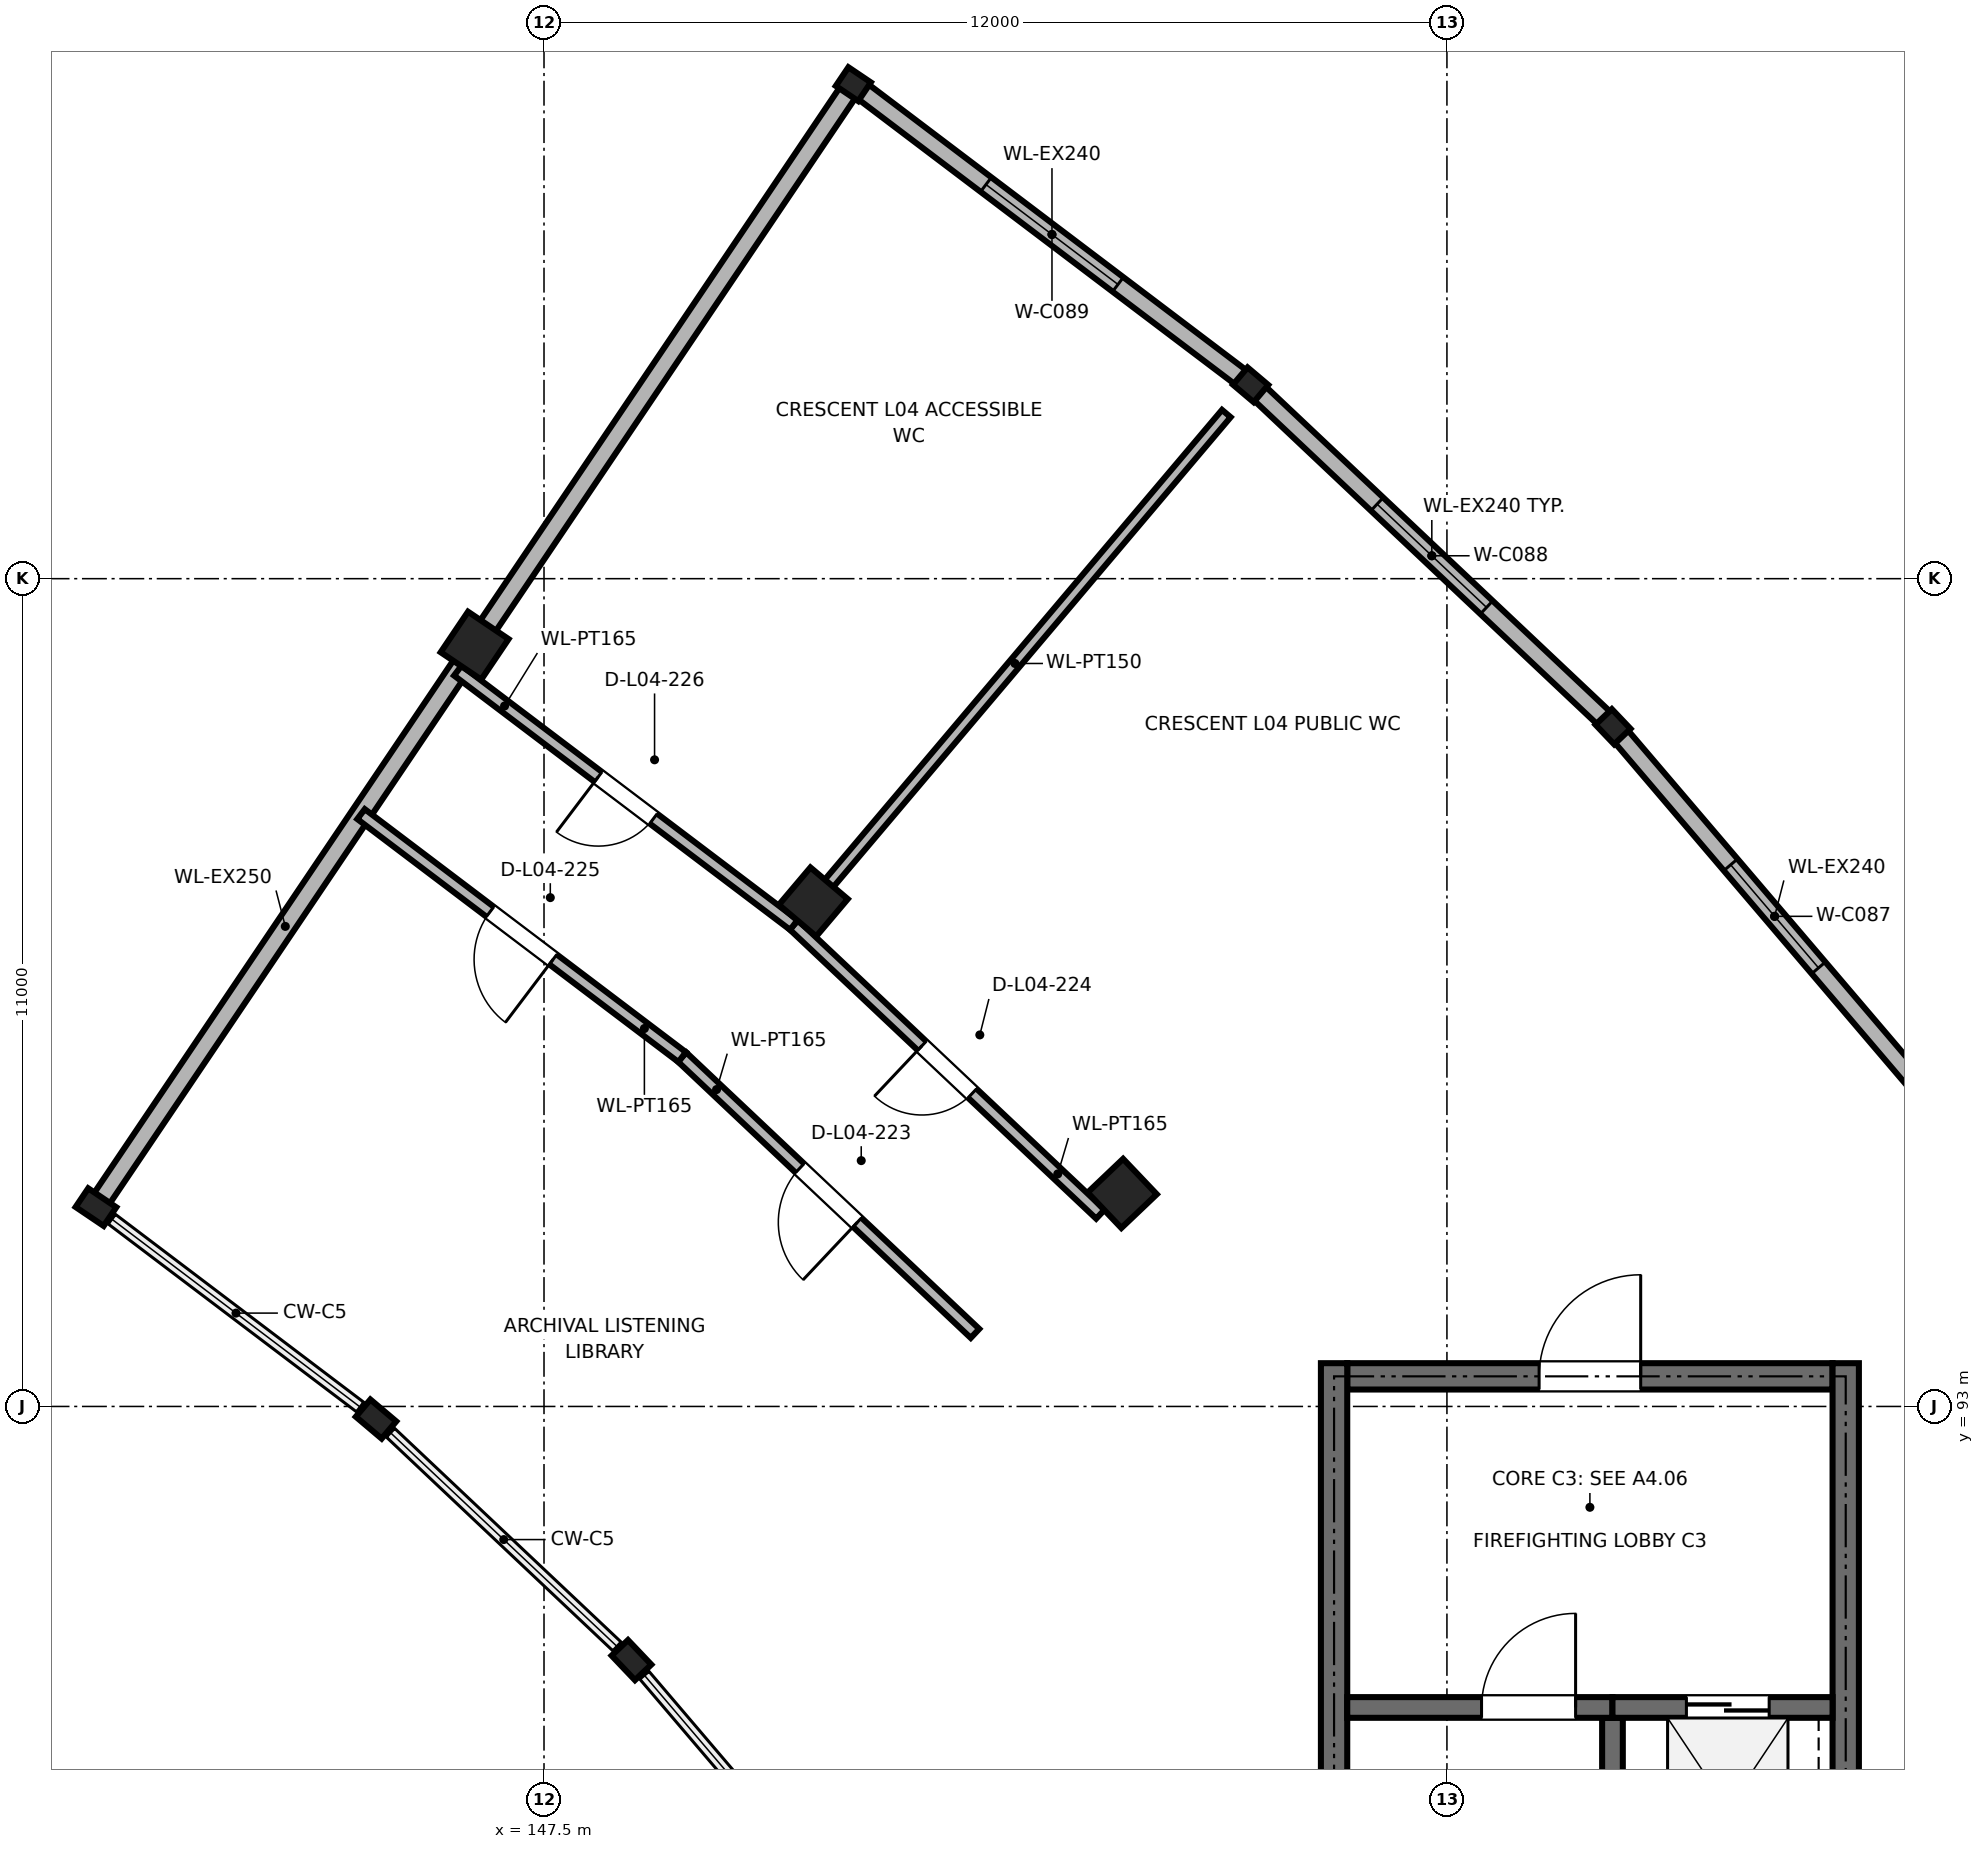
"""IFC4 building model, lengths in metres.
Left out: names, types, materials, properties, quantities, classifications, styles, units other than length and angle.
Written with IfcOpenShell. Run it as: python <this file> out.ifc"""

import sys

from ifc_helpers import new_model, si_unit, direction, frame, frame_2d, origin, origin_2d, place, context, subcontext, project, spatial, rectangle, i_section, extrude, element, fill, save


model = new_model("IFC4")
c1 = context("Model", 3, precision=1e-05, world=origin(), true_north=direction((0.0, 1.0)))
c2 = subcontext(c1, "Body", "Model", "MODEL_VIEW")
j1 = project(units=[si_unit("LENGTHUNIT", "METRE"), si_unit("PLANEANGLEUNIT", "RADIAN")], contexts=[c1])
p1 = place(None, origin())
s1 = spatial("IfcSite", under=j1, at=p1, CompositionType="ELEMENT")
p2 = place(p1, origin())
s2 = spatial("IfcBuilding", under=s1, at=p2, CompositionType="ELEMENT")
p3 = place(p2, frame((0.0, 0.0, 18.6)))
s3 = spatial("IfcBuildingStorey", under=s2, at=p3, CompositionType="ELEMENT", Elevation=18.6)
p4 = place(p3, frame((148.662, 89.629, 0.0), z_axis=(0.0, 0.0, 1.0), x_axis=(0.724653130187, 0.689113808387, 0.0)))
e1 = element("IfcColumn", 1, at=p4, inside=s3, PredefinedType="COLUMN", context=c2, shape_type="SweptSolid", body=[
    extrude(i_section(OverallWidth=0.3, OverallDepth=0.45, WebThickness=0.014, FlangeThickness=0.026, FilletRadius=0.027, at=origin_2d()), origin(), (0.0, 0.0, 1.0), 4.2),
])
p5 = place(p3, frame((155.185, 95.831, 0.0), z_axis=(0.0, 0.0, 1.0), x_axis=(0.724653130187, 0.689113808387, 0.0)))
e2 = element("IfcColumn", 2, at=p5, inside=s3, PredefinedType="COLUMN", context=c2, shape_type="SweptSolid", body=[
    extrude(rectangle(XDim=0.65, YDim=0.65, at=origin_2d()), origin(), (0.0, 0.0, 1.0), 4.2),
])
p6 = place(p3, frame((161.707, 102.032, 0.0), z_axis=(0.0, 0.0, 1.0), x_axis=(0.724653130187, 0.689113808387, 0.0)))
e3 = element("IfcColumn", 3, at=p6, inside=s3, PredefinedType="COLUMN", context=c2, shape_type="SweptSolid", body=[
    extrude(i_section(OverallWidth=0.3, OverallDepth=0.36, WebThickness=0.012, FlangeThickness=0.022, FilletRadius=0.027, at=origin_2d()), origin(), (0.0, 0.0, 1.0), 4.2),
])
p7 = place(p3, frame((145.267, 92.833, 0.0), z_axis=(0.0, 0.0, 1.0), x_axis=(0.645724263505, 0.763570674869, 0.0)))
e4 = element("IfcColumn", 4, at=p7, inside=s3, PredefinedType="COLUMN", context=c2, shape_type="SweptSolid", body=[
    extrude(i_section(OverallWidth=0.3, OverallDepth=0.45, WebThickness=0.014, FlangeThickness=0.026, FilletRadius=0.027, at=origin_2d()), origin(), (0.0, 0.0, 1.0), 4.2),
])
p8 = place(p3, frame((151.079, 99.704, 0.0), z_axis=(0.0, 0.0, 1.0), x_axis=(0.645724263505, 0.763570674869, 0.0)))
e5 = element("IfcColumn", 5, at=p8, inside=s3, PredefinedType="COLUMN", context=c2, shape_type="SweptSolid", body=[
    extrude(rectangle(XDim=0.65, YDim=0.65, at=origin_2d()), origin(), (0.0, 0.0, 1.0), 4.2),
])
p9 = place(p3, frame((156.891, 106.576, 0.0), z_axis=(0.0, 0.0, 1.0), x_axis=(0.645724263505, 0.763570674869, 0.0)))
e6 = element("IfcColumn", 6, at=p9, inside=s3, PredefinedType="COLUMN", context=c2, shape_type="SweptSolid", body=[
    extrude(i_section(OverallWidth=0.3, OverallDepth=0.36, WebThickness=0.012, FlangeThickness=0.022, FilletRadius=0.027, at=origin_2d()), origin(), (0.0, 0.0, 1.0), 4.2),
])
p10 = place(p3, frame((141.545, 95.649, 0.0), z_axis=(0.0, 0.0, 1.0), x_axis=(0.559192903471, 0.829037572555, 0.0)))
e7 = element("IfcColumn", 7, at=p10, inside=s3, PredefinedType="COLUMN", context=c2, shape_type="SweptSolid", body=[
    extrude(i_section(OverallWidth=0.3, OverallDepth=0.45, WebThickness=0.014, FlangeThickness=0.026, FilletRadius=0.027, at=origin_2d()), origin(), (0.0, 0.0, 1.0), 4.2),
])
p11 = place(p3, frame((146.578, 103.11, 0.0), z_axis=(0.0, 0.0, 1.0), x_axis=(0.559192903471, 0.829037572555, 0.0)))
e8 = element("IfcColumn", 8, at=p11, inside=s3, PredefinedType="COLUMN", context=c2, shape_type="SweptSolid", body=[
    extrude(rectangle(XDim=0.65, YDim=0.65, at=origin_2d()), origin(), (0.0, 0.0, 1.0), 4.2),
])
p12 = place(p3, frame((151.611, 110.571, 0.0), z_axis=(0.0, 0.0, 1.0), x_axis=(0.559192903471, 0.829037572555, 0.0)))
e9 = element("IfcColumn", 9, at=p12, inside=s3, PredefinedType="COLUMN", context=c2, shape_type="SweptSolid", body=[
    extrude(i_section(OverallWidth=0.3, OverallDepth=0.36, WebThickness=0.012, FlangeThickness=0.022, FilletRadius=0.027, at=origin_2d()), origin(), (0.0, 0.0, 1.0), 4.2),
])
p13 = place(p3, frame((161.72, 102.017, 0.0), z_axis=(0.0, 0.0, 1.0), x_axis=(0.648708464949, -0.761037007973, 0.0)))
e10 = element("IfcWall", 10, at=p13, inside=s3, PredefinedType="SOLIDWALL", context=c2, shape_type="SweptSolid", body=[
    extrude(rectangle(XDim=6.581, YDim=0.24, at=frame_2d((3.291, 0.0))), origin(), (0.0, 0.0, 1.0), 3.418),
])
p14 = place(p13, frame((2.391, 0.0, 0.9)))
e11 = element("IfcOpeningElement", 11, at=p14, cuts=e10, PredefinedType="OPENING", context=c2, shape_type="SweptSolid", body=[
    extrude(rectangle(XDim=1.8, YDim=1.55, at=frame_2d((0.9, 0.775))), frame((0.0, 0.13, 0.0), z_axis=(0.0, -1.0, 0.0), x_axis=(1.0, 0.0, 0.0)), (0.0, 0.0, 1.0), 0.26),
])
p15 = place(p3, frame((156.906, 106.562, 0.0), z_axis=(0.0, 0.0, 1.0), x_axis=(0.727377231984, -0.686237832235, 0.0)))
e12 = element("IfcWall", 12, at=p15, inside=s3, PredefinedType="SOLIDWALL", context=c2, shape_type="SweptSolid", body=[
    extrude(rectangle(XDim=6.581, YDim=0.24, at=frame_2d((3.291, 0.0))), origin(), (0.0, 0.0, 1.0), 3.418),
])
p16 = place(p15, frame((2.291, 0.0, 0.9)))
e13 = element("IfcOpeningElement", 13, at=p16, cuts=e12, PredefinedType="OPENING", context=c2, shape_type="SweptSolid", body=[
    extrude(rectangle(XDim=2.0, YDim=1.55, at=frame_2d((1.0, 0.775))), frame((0.0, 0.13, 0.0), z_axis=(0.0, -1.0, 0.0), x_axis=(1.0, 0.0, 0.0)), (0.0, 0.0, 1.0), 0.26),
])
p17 = place(p3, frame((151.627, 110.559, 0.0), z_axis=(0.0, 0.0, 1.0), x_axis=(0.797477783019, -0.603348311998, 0.0)))
e14 = element("IfcWall", 14, at=p17, inside=s3, PredefinedType="SOLIDWALL", context=c2, shape_type="SweptSolid", body=[
    extrude(rectangle(XDim=6.581, YDim=0.24, at=frame_2d((3.291, 0.0))), origin(), (0.0, 0.0, 1.0), 3.418),
])
p18 = place(p17, frame((2.191, 0.0, 0.9)))
e15 = element("IfcOpeningElement", 15, at=p18, cuts=e14, PredefinedType="OPENING", context=c2, shape_type="SweptSolid", body=[
    extrude(rectangle(XDim=2.2, YDim=1.55, at=frame_2d((1.1, 0.775))), frame((0.0, 0.13, 0.0), z_axis=(0.0, -1.0, 0.0), x_axis=(1.0, 0.0, 0.0)), (0.0, 0.0, 1.0), 0.26),
])
p19 = place(p3, frame((141.556, 95.665, 0.0), z_axis=(0.0, 0.0, 1.0), x_axis=(0.559200466777, 0.829032470991, 0.0)))
e16 = element("IfcWall", 16, at=p19, inside=s3, PredefinedType="SOLIDWALL", context=c2, shape_type="SweptSolid", body=[
    extrude(rectangle(XDim=8.96, YDim=0.25, at=frame_2d((4.48, 0.0))), origin(), (0.0, 0.0, 1.0), 3.418),
])
p20 = place(p3, frame((146.589, 103.127, 0.0), z_axis=(0.0, 0.0, 1.0), x_axis=(0.559213098812, 0.829023950268, 0.0)))
e17 = element("IfcWall", 17, at=p20, inside=s3, PredefinedType="SOLIDWALL", context=c2, shape_type="SweptSolid", body=[
    extrude(rectangle(XDim=8.96, YDim=0.25, at=frame_2d((4.48, 0.0))), origin(), (0.0, 0.0, 1.0), 3.418),
])
p21 = place(p3, frame((158.175, 93.4, 0.0), z_axis=(0.0, 0.0, 1.0), x_axis=(1.0, 0.0, 0.0)))
e18 = element("IfcWall", 18, at=p21, inside=s3, PredefinedType="SHEAR", context=c2, shape_type="SweptSolid", body=[
    extrude(rectangle(XDim=6.45, YDim=0.35, at=frame_2d((3.225, 0.0))), origin(), (0.0, 0.0, 1.0), 3.98),
])
p22 = place(p21, frame((2.55, 0.0, 0.0)))
e19 = element("IfcOpeningElement", 19, at=p22, cuts=e18, PredefinedType="OPENING", context=c2, shape_type="SweptSolid", body=[
    extrude(rectangle(XDim=1.35, YDim=2.2, at=frame_2d((0.675, 1.1))), frame((0.0, 0.185, 0.0), z_axis=(0.0, -1.0, 0.0), x_axis=(1.0, 0.0, 0.0)), (0.0, 0.0, 1.0), 0.37),
])
for number, where, z_axis, x_axis in (
    (20, (158.0, 81.975, 0.0), (0.0, 0.0, 1.0), (0.0, 1.0, 0.0)),
    (21, (164.8, 81.975, 0.0), (0.0, 0.0, 1.0), (0.0, 1.0, 0.0)),
):
    element("IfcWall", number, at=place(p3, frame(where, z_axis=z_axis, x_axis=x_axis)), inside=s3, PredefinedType="SHEAR", context=c2, shape_type="SweptSolid", body=[
        extrude(rectangle(XDim=11.6, YDim=0.35, at=frame_2d((5.8, 0.0))), origin(), (0.0, 0.0, 1.0), 3.98),
    ])
p23 = place(p3, frame((161.7, 81.975, 0.0), z_axis=(0.0, 0.0, 1.0), x_axis=(0.0, 1.0, 0.0)))
e22 = element("IfcWall", 22, at=p23, inside=s3, PredefinedType="SHEAR", context=c2, shape_type="SweptSolid", body=[
    extrude(rectangle(XDim=6.887, YDim=0.275, at=frame_2d((3.444, 0.0))), origin(), (0.0, 0.0, 1.0), 3.98),
])
p24 = place(p3, frame((158.175, 89.0, 0.0), z_axis=(0.0, 0.0, 1.0), x_axis=(1.0, 0.0, 0.0)))
e23 = element("IfcWall", 23, at=p24, inside=s3, PredefinedType="SHEAR", context=c2, shape_type="SweptSolid", body=[
    extrude(rectangle(XDim=3.525, YDim=0.275, at=frame_2d((1.762, 0.0))), origin(), (0.0, 0.0, 1.0), 3.98),
])
p25 = place(p24, frame((1.785, 0.0, 0.0)))
e24 = element("IfcOpeningElement", 24, at=p25, cuts=e23, PredefinedType="OPENING", context=c2, shape_type="SweptSolid", body=[
    extrude(rectangle(XDim=1.25, YDim=2.15, at=frame_2d((0.625, 1.075))), frame((0.0, 0.147, 0.0), z_axis=(0.0, -1.0, 0.0), x_axis=(1.0, 0.0, 0.0)), (0.0, 0.0, 1.0), 0.295),
])
p26 = place(p3, frame((161.7, 89.0, 0.0), z_axis=(0.0, 0.0, 1.0), x_axis=(1.0, 0.0, 0.0)))
e25 = element("IfcWall", 25, at=p26, inside=s3, PredefinedType="SHEAR", context=c2, shape_type="SweptSolid", body=[
    extrude(rectangle(XDim=2.925, YDim=0.275, at=frame_2d((1.462, 0.0))), origin(), (0.0, 0.0, 1.0), 3.98),
])
p27 = place(p26, frame((0.982, 0.0, 0.0)))
e26 = element("IfcOpeningElement", 26, at=p27, cuts=e25, PredefinedType="OPENING", context=c2, shape_type="SweptSolid", body=[
    extrude(rectangle(XDim=1.1, YDim=2.15, at=frame_2d((0.55, 1.075))), frame((0.0, 0.147, 0.0), z_axis=(0.0, -1.0, 0.0), x_axis=(1.0, 0.0, 0.0)), (0.0, 0.0, 1.0), 0.295),
])
p28 = place(p3, frame((153.228, 93.97, 0.0), z_axis=(0.0, 0.0, 1.0), x_axis=(-0.7273609966, 0.68625504051, 0.0)))
e27 = element("IfcWall", 27, at=p28, inside=s3, PredefinedType="PARTITIONING", context=c2, shape_type="SweptSolid", body=[
    extrude(rectangle(XDim=5.351, YDim=0.165, at=frame_2d((2.676, 0.0))), origin(), (0.0, 0.0, 1.0), 3.42),
])
p29 = place(p28, frame((2.151, 0.0, 0.0)))
e28 = element("IfcOpeningElement", 28, at=p29, cuts=e27, PredefinedType="OPENING", context=c2, shape_type="SweptSolid", body=[
    extrude(rectangle(XDim=1.05, YDim=2.15, at=frame_2d((0.525, 1.075))), frame((0.0, 0.093, 0.0), z_axis=(0.0, -1.0, 0.0), x_axis=(1.0, 0.0, 0.0)), (0.0, 0.0, 1.0), 0.185),
])
p30 = place(p3, frame((154.895, 95.555, 0.0), z_axis=(0.0, 0.0, 1.0), x_axis=(-0.727402273239, 0.686211288807, 0.0)))
e29 = element("IfcWall", 29, at=p30, inside=s3, PredefinedType="PARTITIONING", context=c2, shape_type="SweptSolid", body=[
    extrude(rectangle(XDim=5.601, YDim=0.165, at=frame_2d((2.801, 0.0))), origin(), (0.0, 0.0, 1.0), 3.42),
])
p31 = place(p30, frame((2.341, 0.0, 0.0)))
e30 = element("IfcOpeningElement", 30, at=p31, cuts=e29, PredefinedType="OPENING", context=c2, shape_type="SweptSolid", body=[
    extrude(rectangle(XDim=0.92, YDim=2.1, at=frame_2d((0.46, 1.05))), frame((0.0, 0.093, 0.0), z_axis=(0.0, -1.0, 0.0), x_axis=(1.0, 0.0, 0.0)), (0.0, 0.0, 1.0), 0.185),
])
p32 = place(p3, frame((149.336, 97.643, 0.0), z_axis=(0.0, 0.0, 1.0), x_axis=(-0.797474612376, 0.603352502784, 0.0)))
e31 = element("IfcWall", 31, at=p32, inside=s3, PredefinedType="PARTITIONING", context=c2, shape_type="SweptSolid", body=[
    extrude(rectangle(XDim=5.351, YDim=0.165, at=frame_2d((2.676, 0.0))), origin(), (0.0, 0.0, 1.0), 3.42),
])
p33 = place(p32, frame((2.151, 0.0, 0.0)))
e32 = element("IfcOpeningElement", 32, at=p33, cuts=e31, PredefinedType="OPENING", context=c2, shape_type="SweptSolid", body=[
    extrude(rectangle(XDim=1.05, YDim=2.15, at=frame_2d((0.525, 1.075))), frame((0.0, 0.093, 0.0), z_axis=(0.0, -1.0, 0.0), x_axis=(1.0, 0.0, 0.0)), (0.0, 0.0, 1.0), 0.185),
])
p34 = place(p3, frame((150.821, 99.399, 0.0), z_axis=(0.0, 0.0, 1.0), x_axis=(-0.797450601932, 0.603384237015, 0.0)))
e33 = element("IfcWall", 33, at=p34, inside=s3, PredefinedType="PARTITIONING", context=c2, shape_type="SweptSolid", body=[
    extrude(rectangle(XDim=5.601, YDim=0.165, at=frame_2d((2.8, 0.0))), origin(), (0.0, 0.0, 1.0), 3.42),
])
p35 = place(p34, frame((2.34, 0.0, 0.0)))
e34 = element("IfcOpeningElement", 34, at=p35, cuts=e33, PredefinedType="OPENING", context=c2, shape_type="SweptSolid", body=[
    extrude(rectangle(XDim=0.92, YDim=2.1, at=frame_2d((0.46, 1.05))), frame((0.0, 0.093, 0.0), z_axis=(0.0, -1.0, 0.0), x_axis=(1.0, 0.0, 0.0)), (0.0, 0.0, 1.0), 0.185),
])
p36 = place(p3, frame((150.95, 99.552, 0.0), z_axis=(0.0, 0.0, 1.0), x_axis=(0.645745976221, 0.763552312677, 0.0)))
e35 = element("IfcWall", 35, at=p36, inside=s3, PredefinedType="PARTITIONING", context=c2, shape_type="SweptSolid", body=[
    extrude(rectangle(XDim=8.7, YDim=0.15, at=frame_2d((4.35, 0.0))), origin(), (0.0, 0.0, 1.0), 3.42),
])
p37 = place(p14, origin())
e36 = element("IfcWindow", 36, at=p37, inside=s3, PartitioningType="SINGLE_PANEL", PredefinedType="WINDOW", context=c2, shape_type="SweptSolid", body=[
    extrude(rectangle(XDim=1.8, YDim=1.55, at=frame_2d((0.9, 0.775))), frame((0.0, 0.03, 0.0), z_axis=(0.0, -1.0, 0.0), x_axis=(1.0, 0.0, 0.0)), (0.0, 0.0, 1.0), 0.06),
])
fill(e11, e36)
p38 = place(p16, origin())
e37 = element("IfcWindow", 37, at=p38, inside=s3, PartitioningType="SINGLE_PANEL", PredefinedType="WINDOW", context=c2, shape_type="SweptSolid", body=[
    extrude(rectangle(XDim=2.0, YDim=1.55, at=frame_2d((1.0, 0.775))), frame((0.0, 0.03, 0.0), z_axis=(0.0, -1.0, 0.0), x_axis=(1.0, 0.0, 0.0)), (0.0, 0.0, 1.0), 0.06),
])
fill(e13, e37)
p39 = place(p18, origin())
e38 = element("IfcWindow", 38, at=p39, inside=s3, PartitioningType="SINGLE_PANEL", PredefinedType="WINDOW", context=c2, shape_type="SweptSolid", body=[
    extrude(rectangle(XDim=2.2, YDim=1.55, at=frame_2d((1.1, 0.775))), frame((0.0, 0.03, 0.0), z_axis=(0.0, -1.0, 0.0), x_axis=(1.0, 0.0, 0.0)), (0.0, 0.0, 1.0), 0.06),
])
fill(e15, e38)
p40 = place(p25, origin())
e39 = element("IfcDoor", 39, at=p40, inside=s3, OperationType="SINGLE_SWING_RIGHT", PredefinedType="DOOR", context=c2, shape_type="SweptSolid", body=[
    extrude(rectangle(XDim=1.25, YDim=2.15, at=frame_2d((0.625, 1.075))), frame((0.0, 0.025, 0.0), z_axis=(0.0, -1.0, 0.0), x_axis=(1.0, 0.0, 0.0)), (0.0, 0.0, 1.0), 0.05),
])
fill(e24, e39)
p41 = place(p27, origin())
e40 = element("IfcDoor", 40, at=p41, inside=s3, OperationType="DOUBLE_DOOR_SLIDING", PredefinedType="DOOR", context=c2, shape_type="SweptSolid", body=[
    extrude(rectangle(XDim=1.1, YDim=2.15, at=frame_2d((0.55, 1.075))), frame((0.0, 0.025, 0.0), z_axis=(0.0, -1.0, 0.0), x_axis=(1.0, 0.0, 0.0)), (0.0, 0.0, 1.0), 0.05),
])
fill(e26, e40)
p42 = place(p22, origin())
e41 = element("IfcDoor", 41, at=p42, inside=s3, OperationType="SINGLE_SWING_RIGHT", PredefinedType="DOOR", context=c2, shape_type="SweptSolid", body=[
    extrude(rectangle(XDim=1.35, YDim=2.2, at=frame_2d((0.675, 1.1))), frame((0.0, 0.025, 0.0), z_axis=(0.0, -1.0, 0.0), x_axis=(1.0, 0.0, 0.0)), (0.0, 0.0, 1.0), 0.05),
])
fill(e19, e41)
p43 = place(p29, origin())
e42 = element("IfcDoor", 42, at=p43, inside=s3, OperationType="SINGLE_SWING_LEFT", PredefinedType="DOOR", context=c2, shape_type="SweptSolid", body=[
    extrude(rectangle(XDim=1.05, YDim=2.15, at=frame_2d((0.525, 1.075))), frame((0.0, 0.025, 0.0), z_axis=(0.0, -1.0, 0.0), x_axis=(1.0, 0.0, 0.0)), (0.0, 0.0, 1.0), 0.05),
])
fill(e28, e42)
p44 = place(p31, origin())
e43 = element("IfcDoor", 43, at=p44, inside=s3, OperationType="SINGLE_SWING_RIGHT", PredefinedType="DOOR", context=c2, shape_type="SweptSolid", body=[
    extrude(rectangle(XDim=0.92, YDim=2.1, at=frame_2d((0.46, 1.05))), frame((0.0, 0.025, 0.0), z_axis=(0.0, -1.0, 0.0), x_axis=(1.0, 0.0, 0.0)), (0.0, 0.0, 1.0), 0.05),
])
fill(e30, e43)
p45 = place(p33, origin())
e44 = element("IfcDoor", 44, at=p45, inside=s3, OperationType="SINGLE_SWING_LEFT", PredefinedType="DOOR", context=c2, shape_type="SweptSolid", body=[
    extrude(rectangle(XDim=1.05, YDim=2.15, at=frame_2d((0.525, 1.075))), frame((0.0, 0.025, 0.0), z_axis=(0.0, -1.0, 0.0), x_axis=(1.0, 0.0, 0.0)), (0.0, 0.0, 1.0), 0.05),
])
fill(e32, e44)
p46 = place(p35, origin())
e45 = element("IfcDoor", 45, at=p46, inside=s3, OperationType="SINGLE_SWING_RIGHT", PredefinedType="DOOR", context=c2, shape_type="SweptSolid", body=[
    extrude(rectangle(XDim=0.92, YDim=2.1, at=frame_2d((0.46, 1.05))), frame((0.0, 0.025, 0.0), z_axis=(0.0, -1.0, 0.0), x_axis=(1.0, 0.0, 0.0)), (0.0, 0.0, 1.0), 0.05),
])
fill(e34, e45)
save(model, sys.argv[1])
